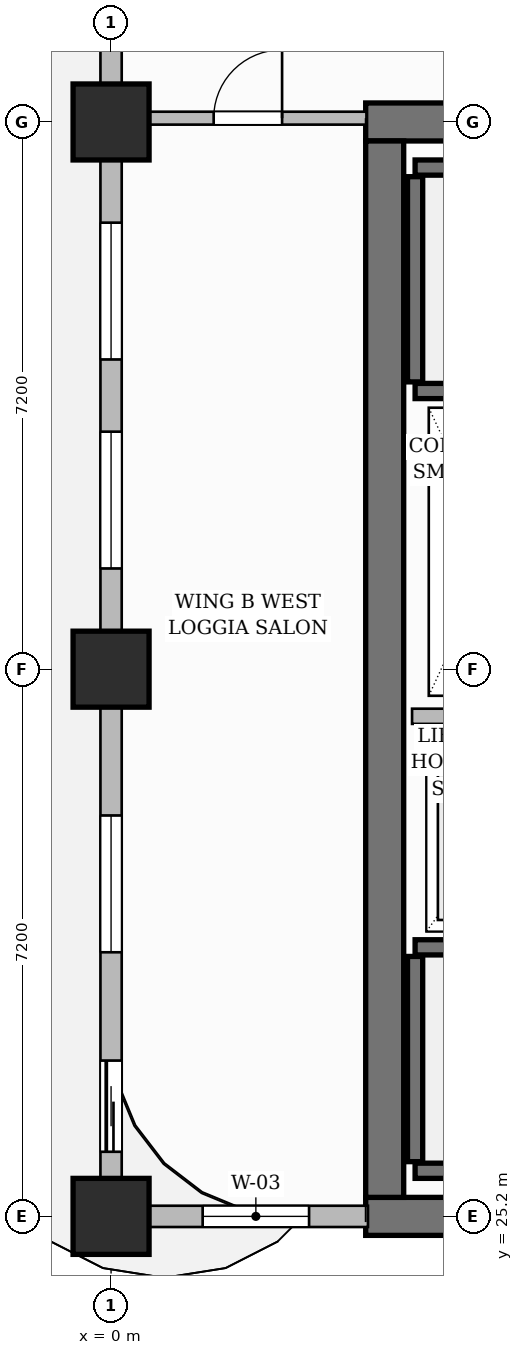
"""IFC4 building model, lengths in metres.
Left out: names, types, materials, properties, quantities, classifications, styles, units other than length and angle.
Written with IfcOpenShell. Run it as: python <this file> out.ifc"""

import sys

from ifc_helpers import new_model, si_unit, direction, frame, frame_2d, origin, origin_2d, place, context, subcontext, project, spatial, rectangle, extrude, source, transform, mapped, element, fill, save


model = new_model("IFC4")
c1 = context("Model", 3, precision=1e-05, world=origin(), true_north=direction((0.0, 1.0)))
c2 = subcontext(c1, "Body", "Model", "MODEL_VIEW")
j1 = project(units=[si_unit("LENGTHUNIT", "METRE"), si_unit("PLANEANGLEUNIT", "RADIAN")], contexts=[c1])
p1 = place(None, origin())
s1 = spatial("IfcSite", under=j1, at=p1, CompositionType="ELEMENT")
p2 = place(p1, origin())
s2 = spatial("IfcBuilding", under=s1, at=p2, CompositionType="ELEMENT")
p3 = place(p2, frame((0.0, 0.0, 158.0)))
s3 = spatial("IfcBuildingStorey", under=s2, at=p3, CompositionType="ELEMENT", Elevation=158.0)
for number, where, z_axis, x_axis in (
    (1, (3.35, 25.2, 0.0), (0.0, 0.0, 1.0), (1.0, 0.0, 0.0)),
    (2, (3.35, 39.6, 0.0), (0.0, 0.0, 1.0), (1.0, 0.0, 0.0)),
):
    element("IfcWall", number, at=place(p3, frame(where, z_axis=z_axis, x_axis=x_axis)), inside=s3, PredefinedType="SHEAR", context=c2, shape_type="SweptSolid", body=[
        extrude(rectangle(XDim=8.3, YDim=0.5, at=frame_2d((4.15, 0.0))), origin(), (0.0, 0.0, 1.0), 3.85),
    ])
p4 = place(p3, frame((3.6, 25.45, 0.0), z_axis=(0.0, 0.0, 1.0), x_axis=(0.0, 1.0, 0.0)))
e3 = element("IfcWall", 3, at=p4, inside=s3, PredefinedType="SHEAR", context=c2, shape_type="SweptSolid", body=[
    extrude(rectangle(XDim=13.9, YDim=0.5, at=frame_2d((6.95, 0.0))), origin(), (0.0, 0.0, 1.0), 3.85),
])
m1 = source(origin(), c2, "Body", "SweptSolid", [
    extrude(rectangle(XDim=1.0, YDim=1.0, at=origin_2d()), origin(), (0.0, 0.0, 1.0), 3.85),
])
for number, where, z_axis, x_axis in (
    (4, (0.0, 25.2, 0.0), (0.0, 0.0, 1.0), (1.0, 0.0, 0.0)),
    (5, (0.0, 32.4, 0.0), (0.0, 0.0, 1.0), (1.0, 0.0, 0.0)),
    (6, (0.0, 39.6, 0.0), (0.0, 0.0, 1.0), (1.0, 0.0, 0.0)),
):
    element("IfcColumn", number, at=place(p3, frame(where, z_axis=z_axis, x_axis=x_axis)), inside=s3, PredefinedType="COLUMN", context=c2, shape_type="MappedRepresentation", body=[
        mapped(m1, transform((0.0, 0.0, 0.0), scale=1.0)),
    ])
p5 = place(p3, frame((4.0, 25.8, 0.0), z_axis=(0.0, 0.0, 1.0), x_axis=(1.0, 0.0, 0.0)))
e7 = element("IfcWall", 7, at=p5, inside=s3, PredefinedType="SHEAR", context=c2, shape_type="SweptSolid", body=[
    extrude(rectangle(XDim=7.1, YDim=0.2, at=frame_2d((3.55, 0.0))), origin(), (0.0, 0.0, 1.0), 3.85),
])
p6 = place(p3, frame((4.0, 25.92, 0.0), z_axis=(0.0, 0.0, 1.0), x_axis=(0.0, 1.0, 0.0)))
e8 = element("IfcWall", 8, at=p6, inside=s3, PredefinedType="SHEAR", context=c2, shape_type="SweptSolid", body=[
    extrude(rectangle(XDim=2.7, YDim=0.2, at=frame_2d((1.35, 0.0))), origin(), (0.0, 0.0, 1.0), 3.85),
])
p7 = place(p3, frame((4.0, 28.74, 0.0), z_axis=(0.0, 0.0, 1.0), x_axis=(1.0, 0.0, 0.0)))
e9 = element("IfcWall", 9, at=p7, inside=s3, PredefinedType="SHEAR", context=c2, shape_type="SweptSolid", body=[
    extrude(rectangle(XDim=7.1, YDim=0.2, at=frame_2d((3.55, 0.0))), origin(), (0.0, 0.0, 1.0), 3.85),
])
p8 = place(p7, frame((5.815, 0.0, 0.0)))
e10 = element("IfcOpeningElement", 10, at=p8, cuts=e9, PredefinedType="OPENING", context=c2, shape_type="SweptSolid", body=[
    extrude(rectangle(XDim=1.05, YDim=2.2, at=frame_2d((0.525, 1.1))), frame((0.0, 0.11, 0.0), z_axis=(0.0, -1.0, 0.0), x_axis=(1.0, 0.0, 0.0)), (0.0, 0.0, 1.0), 0.22),
])
p9 = place(p3, frame((4.0, 39.0, 0.0), z_axis=(0.0, 0.0, 1.0), x_axis=(1.0, 0.0, 0.0)))
e11 = element("IfcWall", 11, at=p9, inside=s3, PredefinedType="SHEAR", context=c2, shape_type="SweptSolid", body=[
    extrude(rectangle(XDim=7.1, YDim=0.2, at=frame_2d((3.55, 0.0))), origin(), (0.0, 0.0, 1.0), 3.85),
])
p10 = place(p3, frame((4.0, 36.18, 0.0), z_axis=(0.0, 0.0, 1.0), x_axis=(0.0, 1.0, 0.0)))
e12 = element("IfcWall", 12, at=p10, inside=s3, PredefinedType="SHEAR", context=c2, shape_type="SweptSolid", body=[
    extrude(rectangle(XDim=2.7, YDim=0.2, at=frame_2d((1.35, 0.0))), origin(), (0.0, 0.0, 1.0), 3.85),
])
p11 = place(p3, frame((4.0, 36.06, 0.0), z_axis=(0.0, 0.0, 1.0), x_axis=(1.0, 0.0, 0.0)))
e13 = element("IfcWall", 13, at=p11, inside=s3, PredefinedType="SHEAR", context=c2, shape_type="SweptSolid", body=[
    extrude(rectangle(XDim=7.1, YDim=0.2, at=frame_2d((3.55, 0.0))), origin(), (0.0, 0.0, 1.0), 3.85),
])
p12 = place(p11, frame((5.815, 0.0, 0.0)))
e14 = element("IfcOpeningElement", 14, at=p12, cuts=e13, PredefinedType="OPENING", context=c2, shape_type="SweptSolid", body=[
    extrude(rectangle(XDim=1.05, YDim=2.2, at=frame_2d((0.525, 1.1))), frame((0.0, 0.11, 0.0), z_axis=(0.0, -1.0, 0.0), x_axis=(1.0, 0.0, 0.0)), (0.0, 0.0, 1.0), 0.22),
])
p13 = place(p3, frame((3.96, 31.78, 0.0), z_axis=(0.0, 0.0, 1.0), x_axis=(1.0, 0.0, 0.0)))
e15 = element("IfcWall", 15, at=p13, inside=s3, PredefinedType="PARTITIONING", context=c2, shape_type="SweptSolid", body=[
    extrude(rectangle(XDim=2.13, YDim=0.2, at=frame_2d((1.065, 0.0))), origin(), (0.0, 0.0, 1.0), 3.6),
])
p14 = place(p3, frame((0.24, 39.65, 0.0), z_axis=(0.0, 0.0, 1.0), x_axis=(1.0, 0.0, 0.0)))
e16 = element("IfcWall", 16, at=p14, inside=s3, PredefinedType="PARTITIONING", context=c2, shape_type="SweptSolid", body=[
    extrude(rectangle(XDim=3.12, YDim=0.17, at=frame_2d((1.56, 0.0))), origin(), (0.0, 0.0, 1.0), 3.6),
])
p15 = place(p14, frame((1.11, 0.0, 0.0)))
e17 = element("IfcOpeningElement", 17, at=p15, cuts=e16, PredefinedType="OPENING", context=c2, shape_type="SweptSolid", body=[
    extrude(rectangle(XDim=0.9, YDim=2.15, at=frame_2d((0.45, 1.075))), frame((0.0, 0.095, 0.0), z_axis=(0.0, -1.0, 0.0), x_axis=(1.0, 0.0, 0.0)), (0.0, 0.0, 1.0), 0.19),
])
p16 = place(p3, frame((0.0, 25.2, 0.0), z_axis=(0.0, 0.0, 1.0), x_axis=(1.0, 0.0, 0.0)))
e18 = element("IfcWall", 18, at=p16, inside=s3, PredefinedType="SOLIDWALL", context=c2, shape_type="SweptSolid", body=[
    extrude(rectangle(XDim=3.38, YDim=0.28, at=frame_2d((1.69, 0.0))), origin(), (0.0, 0.0, 1.0), 3.6),
])
p17 = place(p16, frame((1.205, 0.0, 0.8)))
e19 = element("IfcOpeningElement", 19, at=p17, cuts=e18, PredefinedType="OPENING", context=c2, shape_type="SweptSolid", body=[
    extrude(rectangle(XDim=1.4, YDim=1.85, at=frame_2d((0.7, 0.925))), frame((0.0, 0.15, 0.0), z_axis=(0.0, -1.0, 0.0), x_axis=(1.0, 0.0, 0.0)), (0.0, 0.0, 1.0), 0.3),
])
p18 = place(p3, frame((0.0, 25.25, 0.0), z_axis=(0.0, 0.0, 1.0), x_axis=(0.0, 1.0, 0.0)))
e20 = element("IfcWall", 20, at=p18, inside=s3, PredefinedType="SOLIDWALL", context=c2, shape_type="SweptSolid", body=[
    extrude(rectangle(XDim=21.5, YDim=0.28, at=frame_2d((10.75, 0.0))), origin(), (0.0, 0.0, 1.0), 3.085),
])
p19 = place(p18, frame((18.45, 0.0, 0.0)))
e21 = element("IfcOpeningElement", 21, at=p19, cuts=e20, PredefinedType="OPENING", context=c2, shape_type="SweptSolid", body=[
    extrude(rectangle(XDim=1.2, YDim=2.2, at=frame_2d((0.6, 1.1))), frame((0.0, 0.15, 0.0), z_axis=(0.0, -1.0, 0.0), x_axis=(1.0, 0.0, 0.0)), (0.0, 0.0, 1.0), 0.3),
])
p20 = place(p18, frame((0.8, 0.0, 0.0)))
e22 = element("IfcOpeningElement", 22, at=p20, cuts=e20, PredefinedType="OPENING", context=c2, shape_type="SweptSolid", body=[
    extrude(rectangle(XDim=1.2, YDim=2.2, at=frame_2d((0.6, 1.1))), frame((0.0, 0.15, 0.0), z_axis=(0.0, -1.0, 0.0), x_axis=(1.0, 0.0, 0.0)), (0.0, 0.0, 1.0), 0.3),
])
p21 = place(p18, frame((3.425, 0.0, 0.8)))
e23 = element("IfcOpeningElement", 23, at=p21, cuts=e20, PredefinedType="OPENING", context=c2, shape_type="SweptSolid", body=[
    extrude(rectangle(XDim=1.8, YDim=1.85, at=frame_2d((0.9, 0.925))), frame((0.0, 0.15, 0.0), z_axis=(0.0, -1.0, 0.0), x_axis=(1.0, 0.0, 0.0)), (0.0, 0.0, 1.0), 0.3),
])
p22 = place(p18, frame((8.475, 0.0, 0.8)))
e24 = element("IfcOpeningElement", 24, at=p22, cuts=e20, PredefinedType="OPENING", context=c2, shape_type="SweptSolid", body=[
    extrude(rectangle(XDim=1.8, YDim=1.85, at=frame_2d((0.9, 0.925))), frame((0.0, 0.15, 0.0), z_axis=(0.0, -1.0, 0.0), x_axis=(1.0, 0.0, 0.0)), (0.0, 0.0, 1.0), 0.3),
])
p23 = place(p18, frame((11.225, 0.0, 0.8)))
e25 = element("IfcOpeningElement", 25, at=p23, cuts=e20, PredefinedType="OPENING", context=c2, shape_type="SweptSolid", body=[
    extrude(rectangle(XDim=1.8, YDim=1.85, at=frame_2d((0.9, 0.925))), frame((0.0, 0.15, 0.0), z_axis=(0.0, -1.0, 0.0), x_axis=(1.0, 0.0, 0.0)), (0.0, 0.0, 1.0), 0.3),
])
p24 = place(p18, frame((15.75, 0.0, 0.8)))
e26 = element("IfcOpeningElement", 26, at=p24, cuts=e20, PredefinedType="OPENING", context=c2, shape_type="SweptSolid", body=[
    extrude(rectangle(XDim=1.8, YDim=1.85, at=frame_2d((0.9, 0.925))), frame((0.0, 0.15, 0.0), z_axis=(0.0, -1.0, 0.0), x_axis=(1.0, 0.0, 0.0)), (0.0, 0.0, 1.0), 0.3),
])
m2 = source(origin(), c2, "Body", "SweptSolid", [
    extrude(rectangle(XDim=0.9, YDim=2.15, at=frame_2d((0.45, 1.075))), frame((0.0, 0.025, 0.0), z_axis=(0.0, -1.0, 0.0), x_axis=(1.0, 0.0, 0.0)), (0.0, 0.0, 1.0), 0.05),
])
p25 = place(p15, origin())
e27 = element("IfcDoor", 27, at=p25, inside=s3, OperationType="SINGLE_SWING_RIGHT", PredefinedType="DOOR", context=c2, shape_type="MappedRepresentation", body=[
    mapped(m2, transform((0.0, 0.0, 0.0), scale=1.0)),
])
fill(e17, e27)
m3 = source(origin(), c2, "Body", "SweptSolid", [
    extrude(rectangle(XDim=1.2, YDim=2.2, at=frame_2d((0.6, 1.1))), frame((0.0, 0.025, 0.0), z_axis=(0.0, -1.0, 0.0), x_axis=(1.0, 0.0, 0.0)), (0.0, 0.0, 1.0), 0.05),
])
p26 = place(p20, origin())
e28 = element("IfcDoor", 28, at=p26, inside=s3, OperationType="SLIDING_TO_LEFT", PredefinedType="DOOR", context=c2, shape_type="MappedRepresentation", body=[
    mapped(m3, transform((0.0, 0.0, 0.0), scale=1.0)),
])
fill(e22, e28)
m4 = source(origin(), c2, "Body", "SweptSolid", [
    extrude(rectangle(XDim=1.4, YDim=1.85, at=frame_2d((0.7, 0.925))), frame((0.0, 0.03, 0.0), z_axis=(0.0, -1.0, 0.0), x_axis=(1.0, 0.0, 0.0)), (0.0, 0.0, 1.0), 0.06),
])
p27 = place(p17, origin())
e29 = element("IfcWindow", 29, at=p27, inside=s3, PartitioningType="SINGLE_PANEL", PredefinedType="WINDOW", context=c2, shape_type="MappedRepresentation", body=[
    mapped(m4, transform((0.0, 0.0, 0.0), scale=1.0)),
])
fill(e19, e29)
m5 = source(origin(), c2, "Body", "SweptSolid", [
    extrude(rectangle(XDim=1.8, YDim=1.85, at=frame_2d((0.9, 0.925))), frame((0.0, 0.03, 0.0), z_axis=(0.0, -1.0, 0.0), x_axis=(1.0, 0.0, 0.0)), (0.0, 0.0, 1.0), 0.06),
])
p28 = place(p21, origin())
e30 = element("IfcWindow", 30, at=p28, inside=s3, PartitioningType="DOUBLE_PANEL_VERTICAL", PredefinedType="WINDOW", context=c2, shape_type="MappedRepresentation", body=[
    mapped(m5, transform((0.0, 0.0, 0.0), scale=1.0)),
])
fill(e23, e30)
p29 = place(p22, origin())
e31 = element("IfcWindow", 31, at=p29, inside=s3, PartitioningType="DOUBLE_PANEL_VERTICAL", PredefinedType="WINDOW", context=c2, shape_type="MappedRepresentation", body=[
    mapped(m5, transform((0.0, 0.0, 0.0), scale=1.0)),
])
fill(e24, e31)
p30 = place(p23, origin())
e32 = element("IfcWindow", 32, at=p30, inside=s3, PartitioningType="DOUBLE_PANEL_VERTICAL", PredefinedType="WINDOW", context=c2, shape_type="MappedRepresentation", body=[
    mapped(m5, transform((0.0, 0.0, 0.0), scale=1.0)),
])
fill(e25, e32)
save(model, sys.argv[1])
